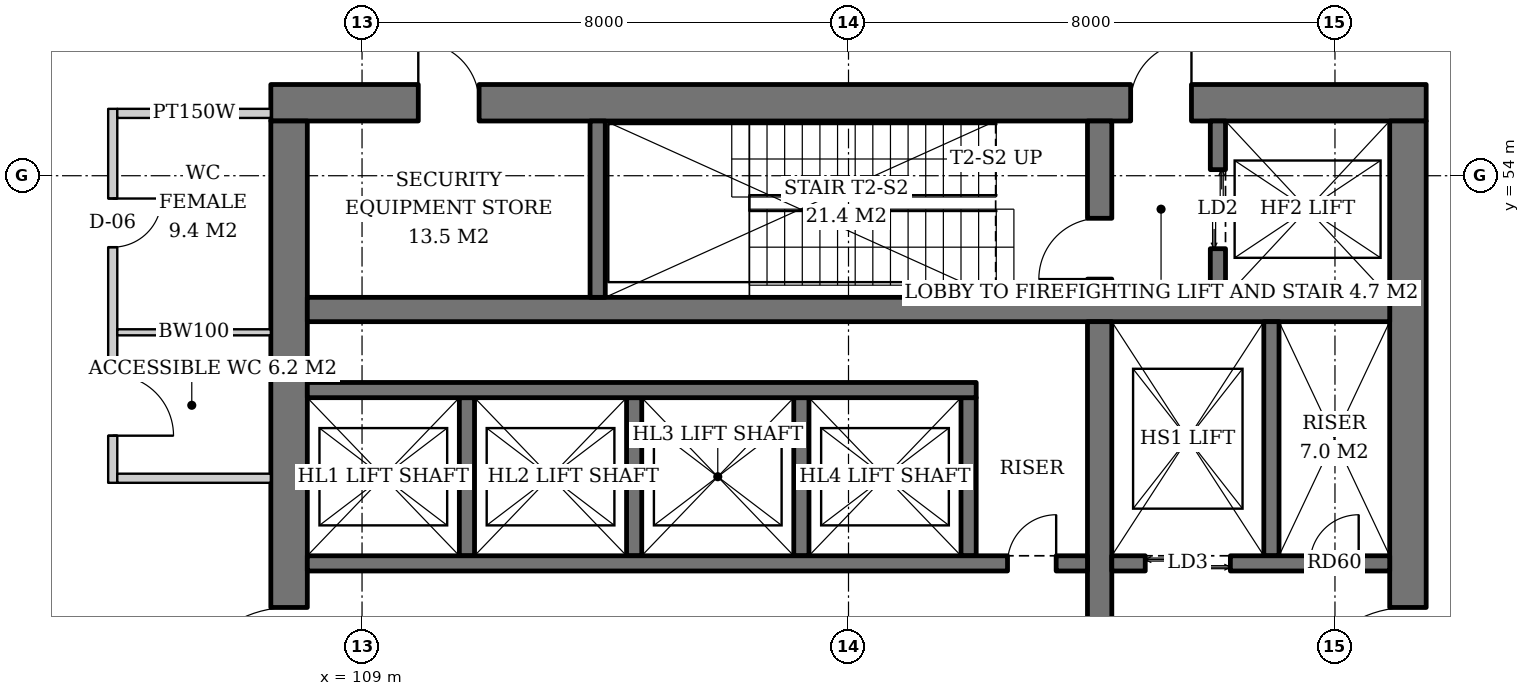
"""IFC4 building model, lengths in metres.
Left out: names, types, materials, properties, quantities, classifications, styles, units other than length and angle.
Written with IfcOpenShell. Run it as: python <this file> out.ifc"""

import sys

from ifc_helpers import new_model, si_unit, direction, frame, frame_2d, origin, place, context, subcontext, project, spatial, rectangle, extrude, element, fill, save


model = new_model("IFC4")
c1 = context("Model", 3, precision=1e-05, world=origin(), true_north=direction((0.0, 1.0)))
c2 = subcontext(c1, "Body", "Model", "MODEL_VIEW")
j1 = project(units=[si_unit("LENGTHUNIT", "METRE"), si_unit("PLANEANGLEUNIT", "RADIAN")], contexts=[c1])
p1 = place(None, origin())
s1 = spatial("IfcSite", under=j1, at=p1, CompositionType="ELEMENT")
p2 = place(p1, origin())
s2 = spatial("IfcBuilding", under=s1, at=p2, CompositionType="ELEMENT")
p3 = place(p2, frame((0.0, 0.0, 16.0)))
s3 = spatial("IfcBuildingStorey", under=s2, at=p3, CompositionType="ELEMENT", Elevation=16.0)
p4 = place(p3, frame((107.5, 55.2, 0.0), z_axis=(0.0, 0.0, 1.0), x_axis=(1.0, 0.0, 0.0)))
e1 = element("IfcWall", 1, at=p4, inside=s3, PredefinedType="SHEAR", context=c2, shape_type="SweptSolid", body=[
    extrude(rectangle(XDim=19.0, YDim=0.6, at=frame_2d((9.5, 0.0))), origin(), (0.0, 0.0, 1.0), 5.0),
])
p5 = place(p4, frame((14.14, 0.0, 0.0)))
e2 = element("IfcOpeningElement", 2, at=p5, cuts=e1, PredefinedType="OPENING", context=c2, shape_type="SweptSolid", body=[
    extrude(rectangle(XDim=1.0, YDim=2.1, at=frame_2d((0.5, 1.05))), frame((0.0, 0.31, 0.0), z_axis=(0.0, -1.0, 0.0), x_axis=(1.0, 0.0, 0.0)), (0.0, 0.0, 1.0), 0.62),
])
p6 = place(p4, frame((2.425, 0.0, 0.0)))
e3 = element("IfcOpeningElement", 3, at=p6, cuts=e1, PredefinedType="OPENING", context=c2, shape_type="SweptSolid", body=[
    extrude(rectangle(XDim=1.0, YDim=2.1, at=frame_2d((0.5, 1.05))), frame((0.0, 0.31, 0.0), z_axis=(0.0, -1.0, 0.0), x_axis=(1.0, 0.0, 0.0)), (0.0, 0.0, 1.0), 0.62),
])
p7 = place(p3, frame((107.8, 37.1, 0.0), z_axis=(0.0, 0.0, 1.0), x_axis=(0.0, 1.0, 0.0)))
e4 = element("IfcWall", 4, at=p7, inside=s3, PredefinedType="SHEAR", context=c2, shape_type="SweptSolid", body=[
    extrude(rectangle(XDim=17.8, YDim=0.6, at=frame_2d((8.9, 0.0))), origin(), (0.0, 0.0, 1.0), 5.0),
])
p8 = place(p7, frame((8.0, 0.0, 0.0)))
e5 = element("IfcOpeningElement", 5, at=p8, cuts=e4, PredefinedType="OPENING", context=c2, shape_type="SweptSolid", body=[
    extrude(rectangle(XDim=1.8, YDim=2.4, at=frame_2d((0.9, 1.2))), frame((0.0, 0.31, 0.0), z_axis=(0.0, -1.0, 0.0), x_axis=(1.0, 0.0, 0.0)), (0.0, 0.0, 1.0), 0.62),
])
p9 = place(p3, frame((126.2, 37.1, 0.0), z_axis=(0.0, 0.0, 1.0), x_axis=(0.0, 1.0, 0.0)))
e6 = element("IfcWall", 6, at=p9, inside=s3, PredefinedType="SHEAR", context=c2, shape_type="SweptSolid", body=[
    extrude(rectangle(XDim=17.8, YDim=0.6, at=frame_2d((8.9, 0.0))), origin(), (0.0, 0.0, 1.0), 5.0),
])
p10 = place(p9, frame((8.0, 0.0, 0.0)))
e7 = element("IfcOpeningElement", 7, at=p10, cuts=e6, PredefinedType="OPENING", context=c2, shape_type="SweptSolid", body=[
    extrude(rectangle(XDim=1.8, YDim=2.4, at=frame_2d((0.9, 1.2))), frame((0.0, 0.31, 0.0), z_axis=(0.0, -1.0, 0.0), x_axis=(1.0, 0.0, 0.0)), (0.0, 0.0, 1.0), 0.62),
])
p11 = place(p3, frame((108.1, 51.8, 0.0), z_axis=(0.0, 0.0, 1.0), x_axis=(1.0, 0.0, 0.0)))
e8 = element("IfcWall", 8, at=p11, inside=s3, PredefinedType="SHEAR", context=c2, shape_type="SweptSolid", body=[
    extrude(rectangle(XDim=17.8, YDim=0.4, at=frame_2d((8.9, 0.0))), origin(), (0.0, 0.0, 1.0), 5.0),
])
p12 = place(p3, frame((121.13, 40.4, 0.0), z_axis=(0.0, 0.0, 1.0), x_axis=(0.0, 1.0, 0.0)))
e9 = element("IfcWall", 9, at=p12, inside=s3, PredefinedType="SHEAR", context=c2, shape_type="SweptSolid", body=[
    extrude(rectangle(XDim=11.2, YDim=0.4, at=frame_2d((5.6, 0.0))), origin(), (0.0, 0.0, 1.0), 5.0),
])
p13 = place(p3, frame((121.13, 52.0, 0.0), z_axis=(0.0, 0.0, 1.0), x_axis=(0.0, 1.0, 0.0)))
e10 = element("IfcWall", 10, at=p13, inside=s3, PredefinedType="SHEAR", context=c2, shape_type="SweptSolid", body=[
    extrude(rectangle(XDim=2.9, YDim=0.4, at=frame_2d((1.45, 0.0))), origin(), (0.0, 0.0, 1.0), 5.0),
])
p14 = place(p13, frame((0.3, 0.0, 0.0)))
e11 = element("IfcOpeningElement", 11, at=p14, cuts=e10, PredefinedType="OPENING", context=c2, shape_type="SweptSolid", body=[
    extrude(rectangle(XDim=1.0, YDim=2.1, at=frame_2d((0.5, 1.05))), frame((0.0, 0.21, 0.0), z_axis=(0.0, -1.0, 0.0), x_axis=(1.0, 0.0, 0.0)), (0.0, 0.0, 1.0), 0.42),
])
p15 = place(p3, frame((112.875, 52.0, 0.0), z_axis=(0.0, 0.0, 1.0), x_axis=(0.0, 1.0, 0.0)))
e12 = element("IfcWall", 12, at=p15, inside=s3, PredefinedType="SHEAR", context=c2, shape_type="SweptSolid", body=[
    extrude(rectangle(XDim=2.9, YDim=0.25, at=frame_2d((1.45, 0.0))), origin(), (0.0, 0.0, 1.0), 5.0),
])
p16 = place(p3, frame((123.075, 52.0, 0.0), z_axis=(0.0, 0.0, 1.0), x_axis=(0.0, 1.0, 0.0)))
e13 = element("IfcWall", 13, at=p16, inside=s3, PredefinedType="SHEAR", context=c2, shape_type="SweptSolid", body=[
    extrude(rectangle(XDim=2.9, YDim=0.25, at=frame_2d((1.45, 0.0))), origin(), (0.0, 0.0, 1.0), 5.0),
])
p17 = place(p16, frame((0.8, 0.0, 0.0)))
e14 = element("IfcOpeningElement", 14, at=p17, cuts=e13, PredefinedType="OPENING", context=c2, shape_type="SweptSolid", body=[
    extrude(rectangle(XDim=1.3, YDim=2.2, at=frame_2d((0.65, 1.1))), frame((0.0, 0.135, 0.0), z_axis=(0.0, -1.0, 0.0), x_axis=(1.0, 0.0, 0.0)), (0.0, 0.0, 1.0), 0.27),
])
for number, where, z_axis, x_axis in (
    (15, (110.725, 47.75, 0.0), (0.0, 0.0, 1.0), (0.0, 1.0, 0.0)),
    (16, (113.475, 47.75, 0.0), (0.0, 0.0, 1.0), (0.0, 1.0, 0.0)),
    (17, (116.225, 47.75, 0.0), (0.0, 0.0, 1.0), (0.0, 1.0, 0.0)),
    (18, (118.975, 47.75, 0.0), (0.0, 0.0, 1.0), (0.0, 1.0, 0.0)),
):
    element("IfcWall", number, at=place(p3, frame(where, z_axis=z_axis, x_axis=x_axis)), inside=s3, PredefinedType="SHEAR", context=c2, shape_type="SweptSolid", body=[
        extrude(rectangle(XDim=2.6, YDim=0.25, at=frame_2d((1.3, 0.0))), origin(), (0.0, 0.0, 1.0), 5.0),
    ])
p18 = place(p3, frame((108.1, 50.475, 0.0), z_axis=(0.0, 0.0, 1.0), x_axis=(1.0, 0.0, 0.0)))
e19 = element("IfcWall", 19, at=p18, inside=s3, PredefinedType="SHEAR", context=c2, shape_type="SweptSolid", body=[
    extrude(rectangle(XDim=11.0, YDim=0.25, at=frame_2d((5.5, 0.0))), origin(), (0.0, 0.0, 1.0), 5.0),
])
p19 = place(p3, frame((108.1, 47.625, 0.0), z_axis=(0.0, 0.0, 1.0), x_axis=(1.0, 0.0, 0.0)))
e20 = element("IfcWall", 20, at=p19, inside=s3, PredefinedType="SHEAR", context=c2, shape_type="SweptSolid", body=[
    extrude(rectangle(XDim=12.83, YDim=0.25, at=frame_2d((6.415, 0.0))), origin(), (0.0, 0.0, 1.0), 5.0),
])
p20 = place(p19, frame((11.515, 0.0, 0.0)))
e21 = element("IfcOpeningElement", 21, at=p20, cuts=e20, PredefinedType="OPENING", context=c2, shape_type="SweptSolid", body=[
    extrude(rectangle(XDim=0.8, YDim=2.0, at=frame_2d((0.4, 1.0))), frame((0.0, 0.135, 0.0), z_axis=(0.0, -1.0, 0.0), x_axis=(1.0, 0.0, 0.0)), (0.0, 0.0, 1.0), 0.27),
])
p21 = place(p3, frame((123.955, 47.75, 0.0), z_axis=(0.0, 0.0, 1.0), x_axis=(0.0, 1.0, 0.0)))
e22 = element("IfcWall", 22, at=p21, inside=s3, PredefinedType="SHEAR", context=c2, shape_type="SweptSolid", body=[
    extrude(rectangle(XDim=3.85, YDim=0.25, at=frame_2d((1.925, 0.0))), origin(), (0.0, 0.0, 1.0), 5.0),
])
p22 = place(p3, frame((121.33, 47.625, 0.0), z_axis=(0.0, 0.0, 1.0), x_axis=(1.0, 0.0, 0.0)))
e23 = element("IfcWall", 23, at=p22, inside=s3, PredefinedType="SHEAR", context=c2, shape_type="SweptSolid", body=[
    extrude(rectangle(XDim=4.57, YDim=0.25, at=frame_2d((2.285, 0.0))), origin(), (0.0, 0.0, 1.0), 5.0),
])
p23 = place(p22, frame((0.55, 0.0, 0.0)))
e24 = element("IfcOpeningElement", 24, at=p23, cuts=e23, PredefinedType="OPENING", context=c2, shape_type="SweptSolid", body=[
    extrude(rectangle(XDim=1.4, YDim=2.4, at=frame_2d((0.7, 1.2))), frame((0.0, 0.135, 0.0), z_axis=(0.0, -1.0, 0.0), x_axis=(1.0, 0.0, 0.0)), (0.0, 0.0, 1.0), 0.27),
])
p24 = place(p22, frame((3.26, 0.0, 0.0)))
e25 = element("IfcOpeningElement", 25, at=p24, cuts=e23, PredefinedType="OPENING", context=c2, shape_type="SweptSolid", body=[
    extrude(rectangle(XDim=0.8, YDim=2.0, at=frame_2d((0.4, 1.0))), frame((0.0, 0.135, 0.0), z_axis=(0.0, -1.0, 0.0), x_axis=(1.0, 0.0, 0.0)), (0.0, 0.0, 1.0), 0.27),
])
p25 = place(p3, frame((104.9, 55.1, 0.0), z_axis=(0.0, 0.0, 1.0), x_axis=(0.0, -1.0, 0.0)))
e26 = element("IfcWall", 26, at=p25, inside=s3, PredefinedType="PARTITIONING", context=c2, shape_type="SweptSolid", body=[
    extrude(rectangle(XDim=6.15, YDim=0.15, at=frame_2d((3.075, 0.0))), origin(), (0.0, 0.0, 1.0), 3.9),
])
p26 = place(p25, frame((1.475, 0.0, 0.0)))
e27 = element("IfcOpeningElement", 27, at=p26, cuts=e26, PredefinedType="OPENING", context=c2, shape_type="SweptSolid", body=[
    extrude(rectangle(XDim=0.8, YDim=2.1, at=frame_2d((0.4, 1.05))), frame((0.0, 0.085, 0.0), z_axis=(0.0, -1.0, 0.0), x_axis=(1.0, 0.0, 0.0)), (0.0, 0.0, 1.0), 0.17),
])
p27 = place(p25, frame((4.375, 0.0, 0.0)))
e28 = element("IfcOpeningElement", 28, at=p27, cuts=e26, PredefinedType="OPENING", context=c2, shape_type="SweptSolid", body=[
    extrude(rectangle(XDim=1.0, YDim=2.1, at=frame_2d((0.5, 1.05))), frame((0.0, 0.085, 0.0), z_axis=(0.0, -1.0, 0.0), x_axis=(1.0, 0.0, 0.0)), (0.0, 0.0, 1.0), 0.17),
])
p28 = place(p3, frame((104.975, 55.025, 0.0), z_axis=(0.0, 0.0, 1.0), x_axis=(1.0, 0.0, 0.0)))
e29 = element("IfcWall", 29, at=p28, inside=s3, PredefinedType="PARTITIONING", context=c2, shape_type="SweptSolid", body=[
    extrude(rectangle(XDim=2.525, YDim=0.15, at=frame_2d((1.262, 0.0))), origin(), (0.0, 0.0, 1.0), 3.9),
])
p29 = place(p3, frame((104.975, 51.425, 0.0), z_axis=(0.0, 0.0, 1.0), x_axis=(1.0, 0.0, 0.0)))
e30 = element("IfcWall", 30, at=p29, inside=s3, PredefinedType="SOLIDWALL", context=c2, shape_type="SweptSolid", body=[
    extrude(rectangle(XDim=2.525, YDim=0.1, at=frame_2d((1.262, 0.0))), origin(), (0.0, 0.0, 1.0), 4.7),
])
p30 = place(p3, frame((104.975, 49.025, 0.0), z_axis=(0.0, 0.0, 1.0), x_axis=(1.0, 0.0, 0.0)))
e31 = element("IfcWall", 31, at=p30, inside=s3, PredefinedType="PARTITIONING", context=c2, shape_type="SweptSolid", body=[
    extrude(rectangle(XDim=2.525, YDim=0.15, at=frame_2d((1.262, 0.0))), origin(), (0.0, 0.0, 1.0), 4.7),
])
p31 = place(p17, origin())
e32 = element("IfcDoor", 32, at=p31, inside=s3, OperationType="DOUBLE_DOOR_SLIDING", PredefinedType="DOOR", context=c2, shape_type="SweptSolid", body=[
    extrude(rectangle(XDim=1.3, YDim=2.2, at=frame_2d((0.65, 1.1))), frame((0.0, 0.025, 0.0), z_axis=(0.0, -1.0, 0.0), x_axis=(1.0, 0.0, 0.0)), (0.0, 0.0, 1.0), 0.05),
])
fill(e14, e32)
p32 = place(p20, origin())
e33 = element("IfcDoor", 33, at=p32, inside=s3, OperationType="SINGLE_SWING_RIGHT", PredefinedType="DOOR", context=c2, shape_type="SweptSolid", body=[
    extrude(rectangle(XDim=0.8, YDim=2.0, at=frame_2d((0.4, 1.0))), frame((0.0, 0.025, 0.0), z_axis=(0.0, -1.0, 0.0), x_axis=(1.0, 0.0, 0.0)), (0.0, 0.0, 1.0), 0.05),
])
fill(e21, e33)
p33 = place(p23, origin())
e34 = element("IfcDoor", 34, at=p33, inside=s3, OperationType="DOUBLE_DOOR_SLIDING", PredefinedType="DOOR", context=c2, shape_type="SweptSolid", body=[
    extrude(rectangle(XDim=1.4, YDim=2.4, at=frame_2d((0.7, 1.2))), frame((0.0, 0.025, 0.0), z_axis=(0.0, -1.0, 0.0), x_axis=(1.0, 0.0, 0.0)), (0.0, 0.0, 1.0), 0.05),
])
fill(e24, e34)
p34 = place(p24, origin())
e35 = element("IfcDoor", 35, at=p34, inside=s3, OperationType="SINGLE_SWING_RIGHT", PredefinedType="DOOR", context=c2, shape_type="SweptSolid", body=[
    extrude(rectangle(XDim=0.8, YDim=2.0, at=frame_2d((0.4, 1.0))), frame((0.0, 0.025, 0.0), z_axis=(0.0, -1.0, 0.0), x_axis=(1.0, 0.0, 0.0)), (0.0, 0.0, 1.0), 0.05),
])
fill(e25, e35)
p35 = place(p14, origin())
e36 = element("IfcDoor", 36, at=p35, inside=s3, OperationType="SINGLE_SWING_LEFT", PredefinedType="DOOR", context=c2, shape_type="SweptSolid", body=[
    extrude(rectangle(XDim=1.0, YDim=2.1, at=frame_2d((0.5, 1.05))), frame((0.0, 0.025, 0.0), z_axis=(0.0, -1.0, 0.0), x_axis=(1.0, 0.0, 0.0)), (0.0, 0.0, 1.0), 0.05),
])
fill(e11, e36)
p36 = place(p5, origin())
e37 = element("IfcDoor", 37, at=p36, inside=s3, OperationType="SINGLE_SWING_RIGHT", PredefinedType="DOOR", context=c2, shape_type="SweptSolid", body=[
    extrude(rectangle(XDim=1.0, YDim=2.1, at=frame_2d((0.5, 1.05))), frame((0.0, 0.025, 0.0), z_axis=(0.0, -1.0, 0.0), x_axis=(1.0, 0.0, 0.0)), (0.0, 0.0, 1.0), 0.05),
])
fill(e2, e37)
p37 = place(p8, origin())
e38 = element("IfcDoor", 38, at=p37, inside=s3, OperationType="DOUBLE_DOOR_SINGLE_SWING", PredefinedType="DOOR", context=c2, shape_type="SweptSolid", body=[
    extrude(rectangle(XDim=1.8, YDim=2.4, at=frame_2d((0.9, 1.2))), frame((0.0, 0.025, 0.0), z_axis=(0.0, -1.0, 0.0), x_axis=(1.0, 0.0, 0.0)), (0.0, 0.0, 1.0), 0.05),
])
fill(e5, e38)
p38 = place(p10, origin())
e39 = element("IfcDoor", 39, at=p38, inside=s3, OperationType="DOUBLE_DOOR_SINGLE_SWING", PredefinedType="DOOR", context=c2, shape_type="SweptSolid", body=[
    extrude(rectangle(XDim=1.8, YDim=2.4, at=frame_2d((0.9, 1.2))), frame((0.0, 0.025, 0.0), z_axis=(0.0, -1.0, 0.0), x_axis=(1.0, 0.0, 0.0)), (0.0, 0.0, 1.0), 0.05),
])
fill(e7, e39)
p39 = place(p6, origin())
e40 = element("IfcDoor", 40, at=p39, inside=s3, OperationType="SINGLE_SWING_LEFT", PredefinedType="DOOR", context=c2, shape_type="SweptSolid", body=[
    extrude(rectangle(XDim=1.0, YDim=2.1, at=frame_2d((0.5, 1.05))), frame((0.0, -0.24, 0.0), z_axis=(0.0, -1.0, 0.0), x_axis=(1.0, 0.0, 0.0)), (0.0, 0.0, 1.0), 0.05),
])
fill(e3, e40)
p40 = place(p26, origin())
e41 = element("IfcDoor", 41, at=p40, inside=s3, OperationType="SINGLE_SWING_LEFT", PredefinedType="DOOR", context=c2, shape_type="SweptSolid", body=[
    extrude(rectangle(XDim=0.8, YDim=2.1, at=frame_2d((0.4, 1.05))), frame((0.0, 0.025, 0.0), z_axis=(0.0, -1.0, 0.0), x_axis=(1.0, 0.0, 0.0)), (0.0, 0.0, 1.0), 0.05),
])
fill(e27, e41)
p41 = place(p27, origin())
e42 = element("IfcDoor", 42, at=p41, inside=s3, OperationType="SINGLE_SWING_RIGHT", PredefinedType="DOOR", context=c2, shape_type="SweptSolid", body=[
    extrude(rectangle(XDim=1.0, YDim=2.1, at=frame_2d((0.5, 1.05))), frame((0.0, 0.025, 0.0), z_axis=(0.0, -1.0, 0.0), x_axis=(1.0, 0.0, 0.0)), (0.0, 0.0, 1.0), 0.05),
])
fill(e28, e42)
save(model, sys.argv[1])
